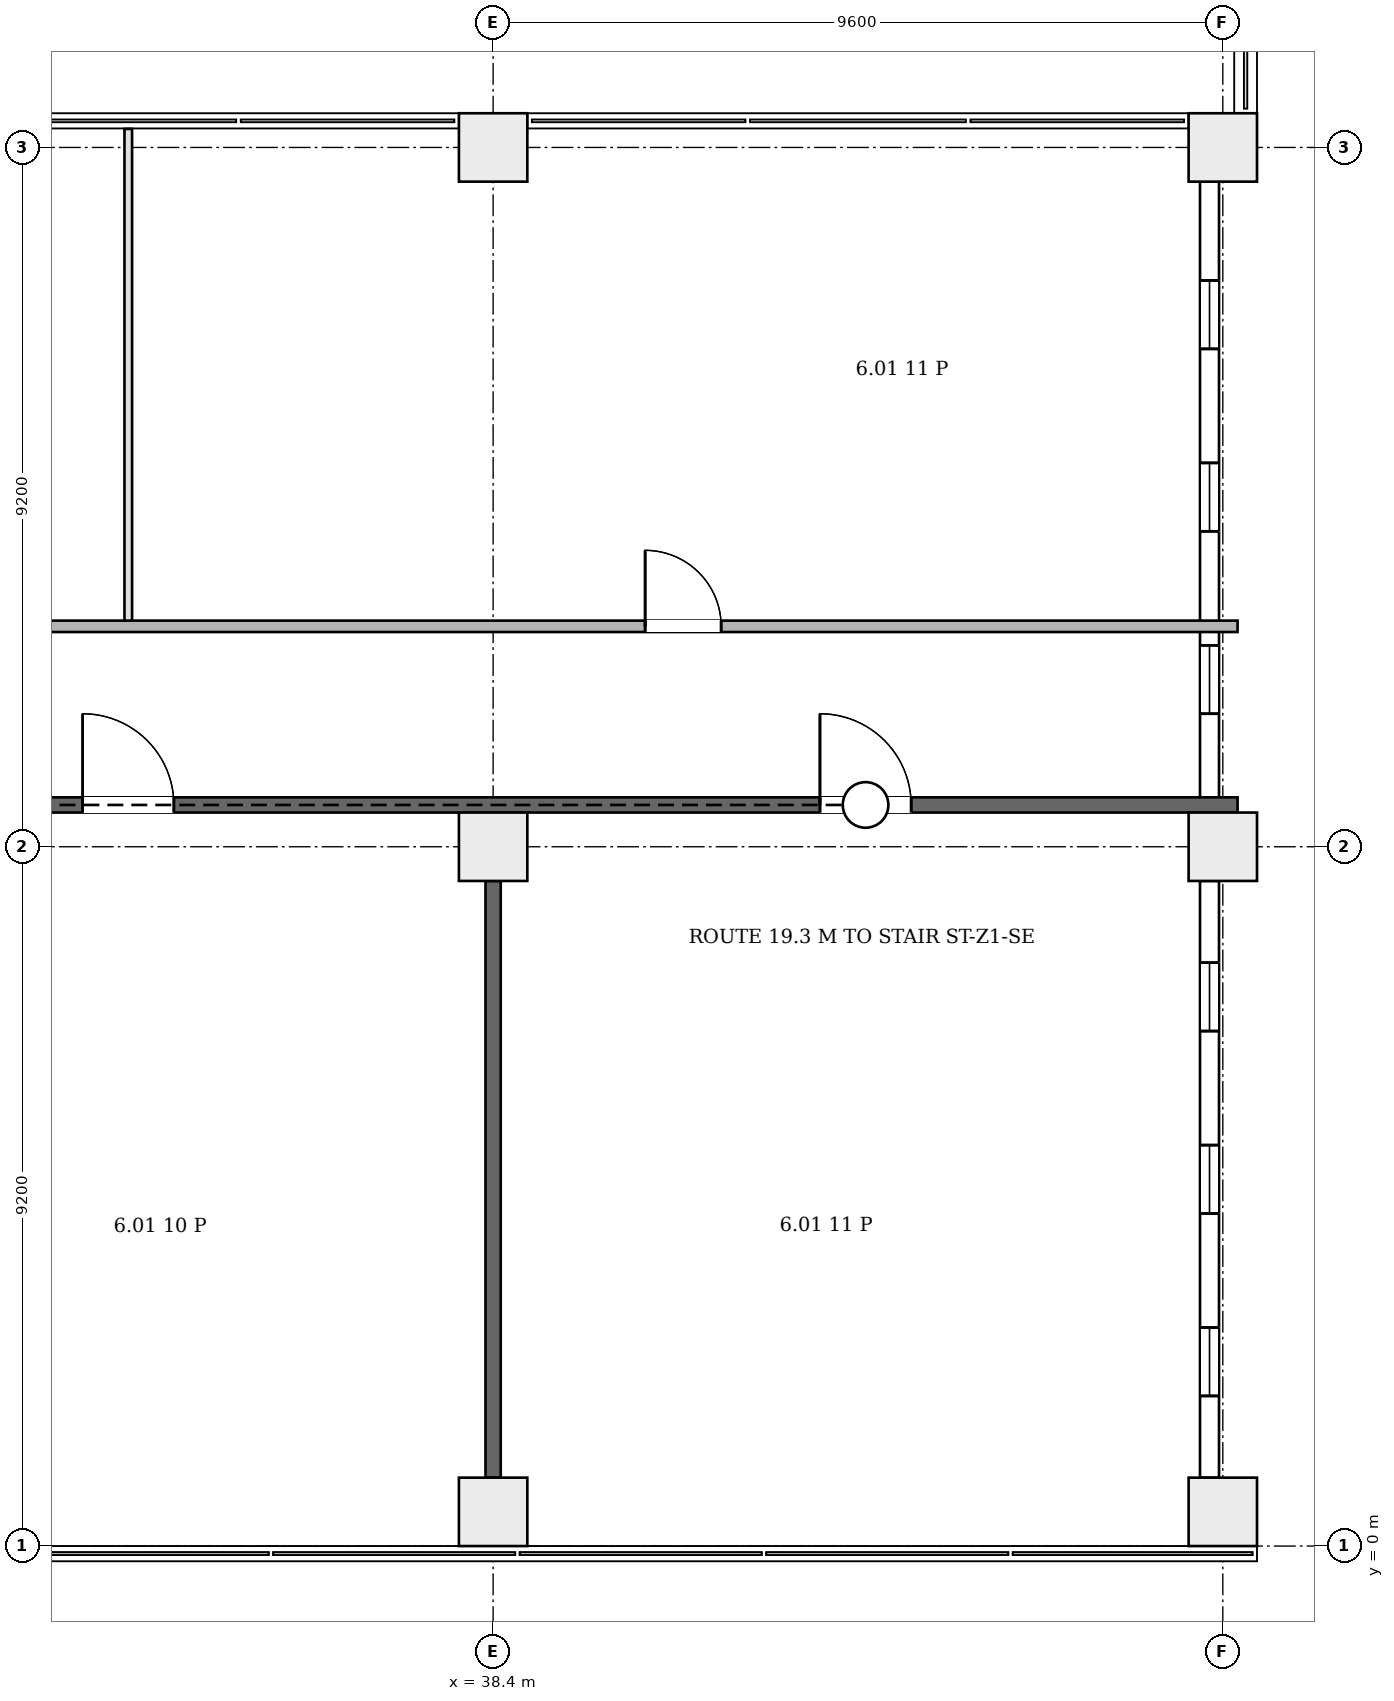
"""IFC4 building model, lengths in metres.
Left out: names, types, materials, properties, quantities, classifications, styles, units other than length and angle.
Written with IfcOpenShell. Run it as: python <this file> out.ifc"""

import sys

from ifc_helpers import new_model, si_unit, direction, frame, frame_2d, origin, origin_2d, place, context, subcontext, project, spatial, rectangle, extrude, element, fill, save


model = new_model("IFC4")
c1 = context("Model", 3, precision=1e-05, world=origin(), true_north=direction((0.0, 1.0)))
c2 = subcontext(c1, "Body", "Model", "MODEL_VIEW")
j1 = project(units=[si_unit("LENGTHUNIT", "METRE"), si_unit("PLANEANGLEUNIT", "RADIAN")], contexts=[c1])
p1 = place(None, origin())
s1 = spatial("IfcSite", under=j1, at=p1, CompositionType="ELEMENT")
p2 = place(p1, origin())
s2 = spatial("IfcBuilding", under=s1, at=p2, CompositionType="ELEMENT")
p3 = place(p2, frame((0.0, 0.0, 36.1)))
s3 = spatial("IfcBuildingStorey", under=s2, at=p3, CompositionType="ELEMENT", Elevation=36.1)
for number, where, z_axis, x_axis in (
    (1, (38.4, 0.45, 0.0), (0.0, 0.0, 1.0), (1.0, 0.0, 0.0)),
    (2, (48.0, 0.45, 0.0), (0.0, 0.0, 1.0), (1.0, 0.0, 0.0)),
    (3, (38.4, 9.2, 0.0), (0.0, 0.0, 1.0), (1.0, 0.0, 0.0)),
    (4, (48.0, 9.2, 0.0), (0.0, 0.0, 1.0), (1.0, 0.0, 0.0)),
    (5, (38.4, 18.4, 0.0), (0.0, 0.0, 1.0), (1.0, 0.0, 0.0)),
    (6, (48.0, 18.4, 0.0), (0.0, 0.0, 1.0), (1.0, 0.0, 0.0)),
):
    element("IfcColumn", number, at=place(p3, frame(where, z_axis=z_axis, x_axis=x_axis)), inside=s3, PredefinedType="COLUMN", context=c2, shape_type="SweptSolid", body=[
        extrude(rectangle(XDim=0.9, YDim=0.9, at=origin_2d()), origin(), (0.0, 0.0, 1.0), 4.2),
    ])
p4 = place(p3, frame((47.825, 0.9, 0.0), z_axis=(0.0, 0.0, 1.0), x_axis=(0.0, 1.0, 0.0)))
e7 = element("IfcWall", 7, at=p4, inside=s3, PredefinedType="ELEMENTEDWALL", context=c2, shape_type="SweptSolid", body=[
    extrude(rectangle(XDim=7.85, YDim=0.25, at=frame_2d((3.925, 0.0))), origin(), (0.0, 0.0, 1.0), 3.3),
])
p5 = place(p4, frame((1.075, 0.0, 0.6)))
e8 = element("IfcOpeningElement", 8, at=p5, cuts=e7, PredefinedType="OPENING", context=c2, shape_type="SweptSolid", body=[
    extrude(rectangle(XDim=0.9, YDim=2.6, at=frame_2d((0.45, 1.3))), frame((0.0, 0.135, 0.0), z_axis=(0.0, -1.0, 0.0), x_axis=(1.0, 0.0, 0.0)), (0.0, 0.0, 1.0), 0.27),
])
p6 = place(p4, frame((3.475, 0.0, 0.6)))
e9 = element("IfcOpeningElement", 9, at=p6, cuts=e7, PredefinedType="OPENING", context=c2, shape_type="SweptSolid", body=[
    extrude(rectangle(XDim=0.9, YDim=2.6, at=frame_2d((0.45, 1.3))), frame((0.0, 0.135, 0.0), z_axis=(0.0, -1.0, 0.0), x_axis=(1.0, 0.0, 0.0)), (0.0, 0.0, 1.0), 0.27),
])
p7 = place(p4, frame((5.875, 0.0, 0.6)))
e10 = element("IfcOpeningElement", 10, at=p7, cuts=e7, PredefinedType="OPENING", context=c2, shape_type="SweptSolid", body=[
    extrude(rectangle(XDim=0.9, YDim=2.6, at=frame_2d((0.45, 1.3))), frame((0.0, 0.135, 0.0), z_axis=(0.0, -1.0, 0.0), x_axis=(1.0, 0.0, 0.0)), (0.0, 0.0, 1.0), 0.27),
])
p8 = place(p3, frame((47.825, 9.65, 0.0), z_axis=(0.0, 0.0, 1.0), x_axis=(0.0, 1.0, 0.0)))
e11 = element("IfcWall", 11, at=p8, inside=s3, PredefinedType="ELEMENTEDWALL", context=c2, shape_type="SweptSolid", body=[
    extrude(rectangle(XDim=8.3, YDim=0.25, at=frame_2d((4.15, 0.0))), origin(), (0.0, 0.0, 1.0), 3.3),
])
p9 = place(p8, frame((1.3, 0.0, 0.6)))
e12 = element("IfcOpeningElement", 12, at=p9, cuts=e11, PredefinedType="OPENING", context=c2, shape_type="SweptSolid", body=[
    extrude(rectangle(XDim=0.9, YDim=2.6, at=frame_2d((0.45, 1.3))), frame((0.0, 0.135, 0.0), z_axis=(0.0, -1.0, 0.0), x_axis=(1.0, 0.0, 0.0)), (0.0, 0.0, 1.0), 0.27),
])
p10 = place(p8, frame((3.7, 0.0, 0.6)))
e13 = element("IfcOpeningElement", 13, at=p10, cuts=e11, PredefinedType="OPENING", context=c2, shape_type="SweptSolid", body=[
    extrude(rectangle(XDim=0.9, YDim=2.6, at=frame_2d((0.45, 1.3))), frame((0.0, 0.135, 0.0), z_axis=(0.0, -1.0, 0.0), x_axis=(1.0, 0.0, 0.0)), (0.0, 0.0, 1.0), 0.27),
])
p11 = place(p8, frame((6.1, 0.0, 0.6)))
e14 = element("IfcOpeningElement", 14, at=p11, cuts=e11, PredefinedType="OPENING", context=c2, shape_type="SweptSolid", body=[
    extrude(rectangle(XDim=0.9, YDim=2.6, at=frame_2d((0.45, 1.3))), frame((0.0, 0.135, 0.0), z_axis=(0.0, -1.0, 0.0), x_axis=(1.0, 0.0, 0.0)), (0.0, 0.0, 1.0), 0.27),
])
p12 = place(p3, frame((4.3, 9.75, 0.0), z_axis=(0.0, 0.0, 1.0), x_axis=(1.0, 0.0, 0.0)))
e15 = element("IfcWall", 15, at=p12, inside=s3, PredefinedType="PARTITIONING", context=c2, shape_type="SweptSolid", body=[
    extrude(rectangle(XDim=43.894, YDim=0.2, at=frame_2d((21.947, 0.0))), origin(), (0.0, 0.0, 1.0), 3.9),
])
p13 = place(p12, frame((2.1, 0.0, 0.0)))
e16 = element("IfcOpeningElement", 16, at=p13, cuts=e15, PredefinedType="OPENING", context=c2, shape_type="SweptSolid", body=[
    extrude(rectangle(XDim=1.2, YDim=2.1, at=frame_2d((0.6, 1.05))), frame((0.0, 0.11, 0.0), z_axis=(0.0, -1.0, 0.0), x_axis=(1.0, 0.0, 0.0)), (0.0, 0.0, 1.0), 0.22),
])
p14 = place(p12, frame((9.5, 0.0, 0.0)))
e17 = element("IfcOpeningElement", 17, at=p14, cuts=e15, PredefinedType="OPENING", context=c2, shape_type="SweptSolid", body=[
    extrude(rectangle(XDim=1.2, YDim=2.1, at=frame_2d((0.6, 1.05))), frame((0.0, 0.11, 0.0), z_axis=(0.0, -1.0, 0.0), x_axis=(1.0, 0.0, 0.0)), (0.0, 0.0, 1.0), 0.22),
])
p15 = place(p12, frame((19.1, 0.0, 0.0)))
e18 = element("IfcOpeningElement", 18, at=p15, cuts=e15, PredefinedType="OPENING", context=c2, shape_type="SweptSolid", body=[
    extrude(rectangle(XDim=1.2, YDim=2.1, at=frame_2d((0.6, 1.05))), frame((0.0, 0.11, 0.0), z_axis=(0.0, -1.0, 0.0), x_axis=(1.0, 0.0, 0.0)), (0.0, 0.0, 1.0), 0.22),
])
p16 = place(p12, frame((28.7, 0.0, 0.0)))
e19 = element("IfcOpeningElement", 19, at=p16, cuts=e15, PredefinedType="OPENING", context=c2, shape_type="SweptSolid", body=[
    extrude(rectangle(XDim=1.2, YDim=2.1, at=frame_2d((0.6, 1.05))), frame((0.0, 0.11, 0.0), z_axis=(0.0, -1.0, 0.0), x_axis=(1.0, 0.0, 0.0)), (0.0, 0.0, 1.0), 0.22),
])
p17 = place(p12, frame((38.4, 0.0, 0.0)))
e20 = element("IfcOpeningElement", 20, at=p17, cuts=e15, PredefinedType="OPENING", context=c2, shape_type="SweptSolid", body=[
    extrude(rectangle(XDim=1.2, YDim=2.1, at=frame_2d((0.6, 1.05))), frame((0.0, 0.11, 0.0), z_axis=(0.0, -1.0, 0.0), x_axis=(1.0, 0.0, 0.0)), (0.0, 0.0, 1.0), 0.22),
])
p18 = place(p3, frame((27.206, 12.1, 0.0), z_axis=(0.0, 0.0, 1.0), x_axis=(1.0, 0.0, 0.0)))
e21 = element("IfcWall", 21, at=p18, inside=s3, PredefinedType="PARTITIONING", context=c2, shape_type="SweptSolid", body=[
    extrude(rectangle(XDim=20.988, YDim=0.15, at=frame_2d((10.494, 0.0))), origin(), (0.0, 0.0, 1.0), 3.9),
])
p19 = place(p18, frame((2.744, 0.0, 0.0)))
e22 = element("IfcOpeningElement", 22, at=p19, cuts=e21, PredefinedType="OPENING", context=c2, shape_type="SweptSolid", body=[
    extrude(rectangle(XDim=0.9, YDim=2.1, at=frame_2d((0.45, 1.05))), frame((0.0, 0.085, 0.0), z_axis=(0.0, -1.0, 0.0), x_axis=(1.0, 0.0, 0.0)), (0.0, 0.0, 1.0), 0.17),
])
p20 = place(p18, frame((13.194, 0.0, 0.0)))
e23 = element("IfcOpeningElement", 23, at=p20, cuts=e21, PredefinedType="OPENING", context=c2, shape_type="SweptSolid", body=[
    extrude(rectangle(XDim=1.0, YDim=2.1, at=frame_2d((0.5, 1.05))), frame((0.0, 0.085, 0.0), z_axis=(0.0, -1.0, 0.0), x_axis=(1.0, 0.0, 0.0)), (0.0, 0.0, 1.0), 0.17),
])
p21 = place(p3, frame((33.6, 12.175, 0.0), z_axis=(0.0, 0.0, 1.0), x_axis=(0.0, 1.0, 0.0)))
e24 = element("IfcWall", 24, at=p21, inside=s3, PredefinedType="PARTITIONING", context=c2, shape_type="SweptSolid", body=[
    extrude(rectangle(XDim=6.469, YDim=0.1, at=frame_2d((3.234, 0.0))), origin(), (0.0, 0.0, 1.0), 3.9),
])
p22 = place(p3, frame((38.4, 0.9, 0.0), z_axis=(0.0, 0.0, 1.0), x_axis=(0.0, 1.0, 0.0)))
e25 = element("IfcWall", 25, at=p22, inside=s3, PredefinedType="PARTITIONING", context=c2, shape_type="SweptSolid", body=[
    extrude(rectangle(XDim=7.85, YDim=0.2, at=frame_2d((3.925, 0.0))), origin(), (0.0, 0.0, 1.0), 3.9),
])
p23 = place(p5, origin())
e26 = element("IfcWindow", 26, at=p23, inside=s3, PartitioningType="SINGLE_PANEL", PredefinedType="WINDOW", context=c2, shape_type="SweptSolid", body=[
    extrude(rectangle(XDim=0.9, YDim=2.6, at=frame_2d((0.45, 1.3))), frame((0.0, 0.03, 0.0), z_axis=(0.0, -1.0, 0.0), x_axis=(1.0, 0.0, 0.0)), (0.0, 0.0, 1.0), 0.06),
])
fill(e8, e26)
p24 = place(p6, origin())
e27 = element("IfcWindow", 27, at=p24, inside=s3, PartitioningType="SINGLE_PANEL", PredefinedType="WINDOW", context=c2, shape_type="SweptSolid", body=[
    extrude(rectangle(XDim=0.9, YDim=2.6, at=frame_2d((0.45, 1.3))), frame((0.0, 0.03, 0.0), z_axis=(0.0, -1.0, 0.0), x_axis=(1.0, 0.0, 0.0)), (0.0, 0.0, 1.0), 0.06),
])
fill(e9, e27)
p25 = place(p7, origin())
e28 = element("IfcWindow", 28, at=p25, inside=s3, PartitioningType="SINGLE_PANEL", PredefinedType="WINDOW", context=c2, shape_type="SweptSolid", body=[
    extrude(rectangle(XDim=0.9, YDim=2.6, at=frame_2d((0.45, 1.3))), frame((0.0, 0.03, 0.0), z_axis=(0.0, -1.0, 0.0), x_axis=(1.0, 0.0, 0.0)), (0.0, 0.0, 1.0), 0.06),
])
fill(e10, e28)
p26 = place(p9, origin())
e29 = element("IfcWindow", 29, at=p26, inside=s3, PartitioningType="SINGLE_PANEL", PredefinedType="WINDOW", context=c2, shape_type="SweptSolid", body=[
    extrude(rectangle(XDim=0.9, YDim=2.6, at=frame_2d((0.45, 1.3))), frame((0.0, 0.03, 0.0), z_axis=(0.0, -1.0, 0.0), x_axis=(1.0, 0.0, 0.0)), (0.0, 0.0, 1.0), 0.06),
])
fill(e12, e29)
p27 = place(p10, origin())
e30 = element("IfcWindow", 30, at=p27, inside=s3, PartitioningType="SINGLE_PANEL", PredefinedType="WINDOW", context=c2, shape_type="SweptSolid", body=[
    extrude(rectangle(XDim=0.9, YDim=2.6, at=frame_2d((0.45, 1.3))), frame((0.0, 0.03, 0.0), z_axis=(0.0, -1.0, 0.0), x_axis=(1.0, 0.0, 0.0)), (0.0, 0.0, 1.0), 0.06),
])
fill(e13, e30)
p28 = place(p11, origin())
e31 = element("IfcWindow", 31, at=p28, inside=s3, PartitioningType="SINGLE_PANEL", PredefinedType="WINDOW", context=c2, shape_type="SweptSolid", body=[
    extrude(rectangle(XDim=0.9, YDim=2.6, at=frame_2d((0.45, 1.3))), frame((0.0, 0.03, 0.0), z_axis=(0.0, -1.0, 0.0), x_axis=(1.0, 0.0, 0.0)), (0.0, 0.0, 1.0), 0.06),
])
fill(e14, e31)
p29 = place(p16, origin())
e32 = element("IfcDoor", 32, at=p29, inside=s3, OperationType="SINGLE_SWING_RIGHT", PredefinedType="DOOR", context=c2, shape_type="SweptSolid", body=[
    extrude(rectangle(XDim=1.2, YDim=2.1, at=frame_2d((0.6, 1.05))), frame((0.0, 0.025, 0.0), z_axis=(0.0, -1.0, 0.0), x_axis=(1.0, 0.0, 0.0)), (0.0, 0.0, 1.0), 0.05),
])
fill(e19, e32)
p30 = place(p17, origin())
e33 = element("IfcDoor", 33, at=p30, inside=s3, OperationType="SINGLE_SWING_LEFT", PredefinedType="DOOR", context=c2, shape_type="SweptSolid", body=[
    extrude(rectangle(XDim=1.2, YDim=2.1, at=frame_2d((0.6, 1.05))), frame((0.0, 0.025, 0.0), z_axis=(0.0, -1.0, 0.0), x_axis=(1.0, 0.0, 0.0)), (0.0, 0.0, 1.0), 0.05),
])
fill(e20, e33)
p31 = place(p20, origin())
e34 = element("IfcDoor", 34, at=p31, inside=s3, OperationType="SINGLE_SWING_RIGHT", PredefinedType="DOOR", context=c2, shape_type="SweptSolid", body=[
    extrude(rectangle(XDim=1.0, YDim=2.1, at=frame_2d((0.5, 1.05))), frame((0.0, 0.025, 0.0), z_axis=(0.0, -1.0, 0.0), x_axis=(1.0, 0.0, 0.0)), (0.0, 0.0, 1.0), 0.05),
])
fill(e23, e34)
save(model, sys.argv[1])
